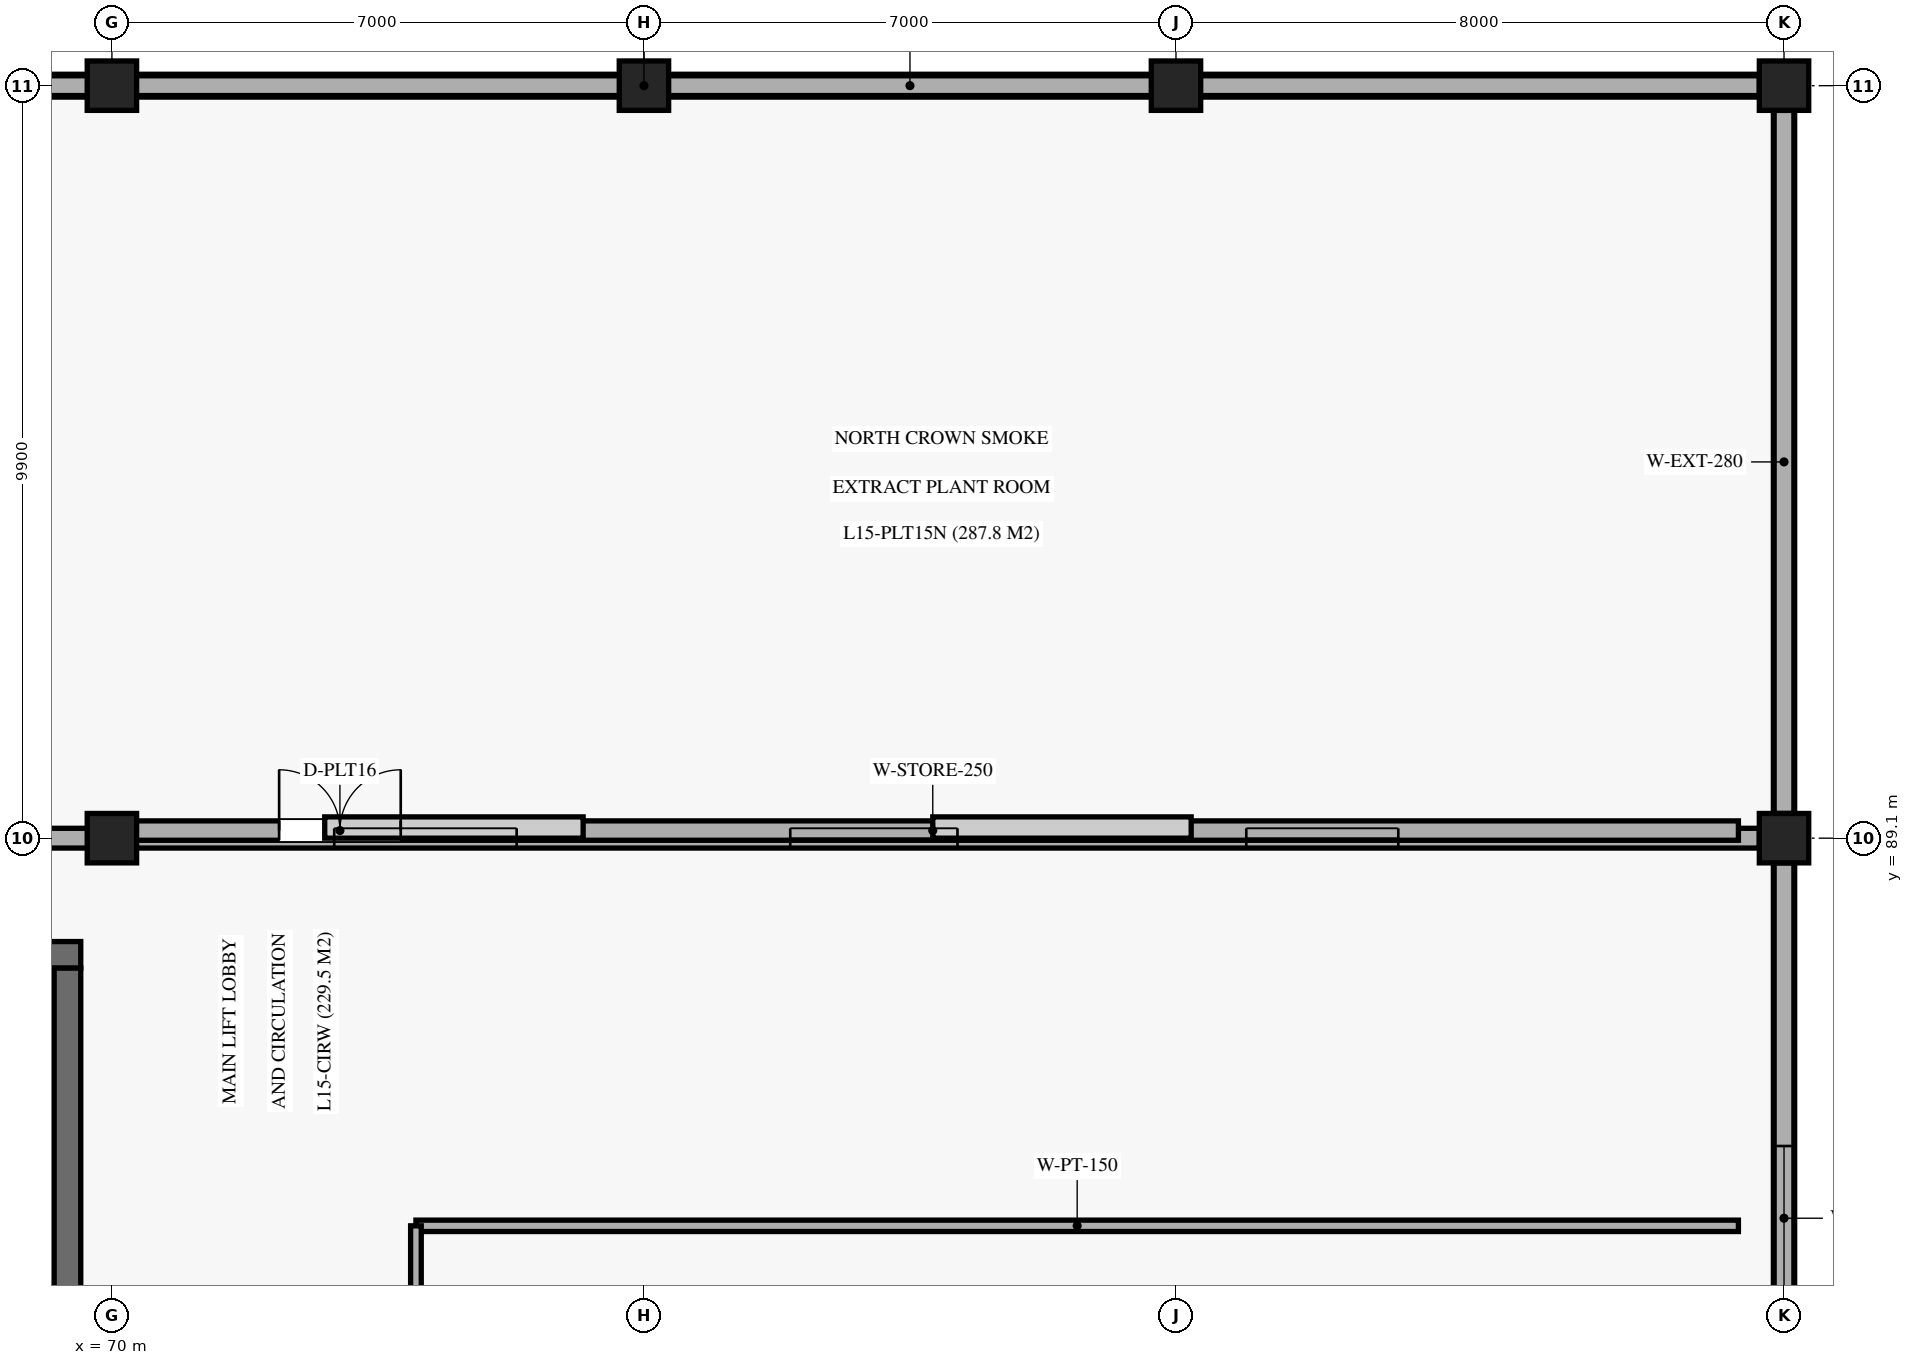
"""IFC4 building model, lengths in metres.
Left out: names, types, materials, properties, quantities, classifications, styles, units other than length and angle.
Written with IfcOpenShell. Run it as: python <this file> out.ifc"""

import sys

from ifc_helpers import new_model, si_unit, direction, frame, frame_2d, origin, origin_2d, place, context, subcontext, project, spatial, polyline, rectangle, outline, extrude, element, fill, save


model = new_model("IFC4")
c1 = context("Model", 3, precision=1e-05, world=origin(), true_north=direction((0.0, 1.0)))
c2 = subcontext(c1, "Body", "Model", "MODEL_VIEW")
j1 = project(units=[si_unit("LENGTHUNIT", "METRE"), si_unit("PLANEANGLEUNIT", "RADIAN")], contexts=[c1])
p1 = place(None, origin())
s1 = spatial("IfcSite", under=j1, at=p1, CompositionType="ELEMENT")
p2 = place(p1, origin())
s2 = spatial("IfcBuilding", under=s1, at=p2, CompositionType="ELEMENT")
p3 = place(p2, frame((0.0, 0.0, 74.46)))
s3 = spatial("IfcBuildingStorey", under=s2, at=p3, CompositionType="ELEMENT", Elevation=74.46)
p4 = place(p3, frame((70.0, 89.1, 0.0), z_axis=(0.0, 0.0, 1.0), x_axis=(1.0, 0.0, 0.0)))
e1 = element("IfcColumn", 1, at=p4, inside=s3, PredefinedType="COLUMN", context=c2, shape_type="SweptSolid", body=[
    extrude(rectangle(XDim=0.65, YDim=0.65, at=origin_2d()), origin(), (0.0, 0.0, 1.0), 7.49),
])
for number, where, z_axis, x_axis in (
    (2, (70.0, 99.0, 0.0), (0.0, 0.0, 1.0), (1.0, 0.0, 0.0)),
    (3, (77.0, 99.0, 0.0), (0.0, 0.0, 1.0), (1.0, 0.0, 0.0)),
    (4, (84.0, 99.0, 0.0), (0.0, 0.0, 1.0), (1.0, 0.0, 0.0)),
):
    element("IfcColumn", number, at=place(p3, frame(where, z_axis=z_axis, x_axis=x_axis)), inside=s3, PredefinedType="COLUMN", context=c2, shape_type="SweptSolid", body=[
        extrude(rectangle(XDim=0.65, YDim=0.65, at=origin_2d()), origin(), (0.0, 0.0, 1.0), 5.66),
    ])
p5 = place(p3, frame((92.0, 89.1, 0.0), z_axis=(0.0, 0.0, 1.0), x_axis=(1.0, 0.0, 0.0)))
e5 = element("IfcColumn", 5, at=p5, inside=s3, PredefinedType="COLUMN", context=c2, shape_type="SweptSolid", body=[
    extrude(rectangle(XDim=0.65, YDim=0.65, at=origin_2d()), origin(), (0.0, 0.0, 1.0), 7.49),
])
p6 = place(p3, frame((92.0, 99.0, 0.0), z_axis=(0.0, 0.0, 1.0), x_axis=(1.0, 0.0, 0.0)))
e6 = element("IfcColumn", 6, at=p6, inside=s3, PredefinedType="COLUMN", context=c2, shape_type="SweptSolid", body=[
    extrude(rectangle(XDim=0.65, YDim=0.65, at=origin_2d()), origin(), (0.0, 0.0, 1.0), 5.66),
])
p7 = place(p3, frame((92.0, 79.525, 0.0), z_axis=(0.0, 0.0, 1.0), x_axis=(0.0, 1.0, 0.0)))
e7 = element("IfcWall", 7, at=p7, inside=s3, PredefinedType="SOLIDWALL", context=c2, shape_type="SweptSolid", body=[
    extrude(rectangle(XDim=9.25, YDim=0.28, at=frame_2d((4.625, 0.0))), origin(), (0.0, 0.0, 1.0), 3.29),
])
p8 = place(p7, frame((3.625, 0.0, 1.45)))
e8 = element("IfcOpeningElement", 8, at=p8, cuts=e7, PredefinedType="OPENING", context=c2, shape_type="SweptSolid", body=[
    extrude(rectangle(XDim=1.9, YDim=1.45, at=frame_2d((0.95, 0.725))), frame((0.0, 0.15, 0.0), z_axis=(0.0, -1.0, 0.0), x_axis=(1.0, 0.0, 0.0)), (0.0, 0.0, 1.0), 0.3),
])
p9 = place(p3, frame((92.0, 89.425, 0.0), z_axis=(0.0, 0.0, 1.0), x_axis=(0.0, 1.0, 0.0)))
e9 = element("IfcWall", 9, at=p9, inside=s3, PredefinedType="SOLIDWALL", context=c2, shape_type="SweptSolid", body=[
    extrude(rectangle(XDim=9.25, YDim=0.28, at=frame_2d((4.625, 0.0))), origin(), (0.0, 0.0, 1.0), 3.29),
])
p10 = place(p3, frame((62.325, 99.0, 0.0), z_axis=(0.0, 0.0, 1.0), x_axis=(1.0, 0.0, 0.0)))
e10 = element("IfcWall", 10, at=p10, inside=s3, PredefinedType="SOLIDWALL", context=c2, shape_type="SweptSolid", body=[
    extrude(rectangle(XDim=7.35, YDim=0.3, at=frame_2d((3.675, 0.0))), origin(), (0.0, 0.0, 1.0), 3.29),
])
for number, where, z_axis, x_axis in (
    (11, (70.325, 99.0, 0.0), (0.0, 0.0, 1.0), (1.0, 0.0, 0.0)),
    (12, (77.325, 99.0, 0.0), (0.0, 0.0, 1.0), (1.0, 0.0, 0.0)),
):
    element("IfcWall", number, at=place(p3, frame(where, z_axis=z_axis, x_axis=x_axis)), inside=s3, PredefinedType="SOLIDWALL", context=c2, shape_type="SweptSolid", body=[
        extrude(rectangle(XDim=6.35, YDim=0.3, at=frame_2d((3.175, 0.0))), origin(), (0.0, 0.0, 1.0), 3.29),
    ])
p11 = place(p3, frame((84.325, 99.0, 0.0), z_axis=(0.0, 0.0, 1.0), x_axis=(1.0, 0.0, 0.0)))
e13 = element("IfcWall", 13, at=p11, inside=s3, PredefinedType="SOLIDWALL", context=c2, shape_type="SweptSolid", body=[
    extrude(rectangle(XDim=7.35, YDim=0.3, at=frame_2d((3.675, 0.0))), origin(), (0.0, 0.0, 1.0), 3.29),
])
p12 = place(p3, frame((62.325, 99.0, 4.04), z_axis=(0.0, 0.0, 1.0), x_axis=(1.0, 0.0, 0.0)))
e14 = element("IfcWall", 14, at=p12, inside=s3, PredefinedType="SOLIDWALL", context=c2, shape_type="SweptSolid", body=[
    extrude(rectangle(XDim=29.35, YDim=0.26, at=frame_2d((14.675, 0.0))), origin(), (0.0, 0.0, 1.0), 1.362),
])
p13 = place(p3, frame((92.0, 89.425, 4.04), z_axis=(0.0, 0.0, 1.0), x_axis=(0.0, 1.0, 0.0)))
e15 = element("IfcWall", 15, at=p13, inside=s3, PredefinedType="SOLIDWALL", context=c2, shape_type="SweptSolid", body=[
    extrude(outline(polyline([(0.0, 0.0), (9.25, 0.0), (9.25, 1.72), (0.0, 0.08), (0.0, 0.0)])), frame((0.0, 0.13, 0.0), z_axis=(0.0, -1.0, 0.0), x_axis=(1.0, 0.0, 0.0)), (0.0, 0.0, 1.0), 0.26),
])
p14 = place(p3, frame((62.325, 89.1, 4.04), z_axis=(0.0, 0.0, 1.0), x_axis=(1.0, 0.0, 0.0)))
e16 = element("IfcWall", 16, at=p14, inside=s3, PredefinedType="SOLIDWALL", context=c2, shape_type="SweptSolid", body=[
    extrude(rectangle(XDim=29.35, YDim=0.26, at=frame_2d((14.675, 0.0))), origin(), (0.0, 0.0, 1.0), 2.956),
])
p15 = place(p14, frame((3.6, 0.0, 1.15)))
e17 = element("IfcOpeningElement", 17, at=p15, cuts=e16, PredefinedType="OPENING", context=c2, shape_type="SweptSolid", body=[
    extrude(rectangle(XDim=2.6, YDim=1.45, at=frame_2d((1.3, 0.725))), frame((0.0, 0.14, 0.0), z_axis=(0.0, -1.0, 0.0), x_axis=(1.0, 0.0, 0.0)), (0.0, 0.0, 1.0), 0.28),
])
p16 = place(p14, frame((10.6, 0.0, 1.15)))
e18 = element("IfcOpeningElement", 18, at=p16, cuts=e16, PredefinedType="OPENING", context=c2, shape_type="SweptSolid", body=[
    extrude(rectangle(XDim=2.4, YDim=1.45, at=frame_2d((1.2, 0.725))), frame((0.0, 0.14, 0.0), z_axis=(0.0, -1.0, 0.0), x_axis=(1.0, 0.0, 0.0)), (0.0, 0.0, 1.0), 0.28),
])
p17 = place(p14, frame((16.6, 0.0, 1.15)))
e19 = element("IfcOpeningElement", 19, at=p17, cuts=e16, PredefinedType="OPENING", context=c2, shape_type="SweptSolid", body=[
    extrude(rectangle(XDim=2.2, YDim=1.45, at=frame_2d((1.1, 0.725))), frame((0.0, 0.14, 0.0), z_axis=(0.0, -1.0, 0.0), x_axis=(1.0, 0.0, 0.0)), (0.0, 0.0, 1.0), 0.28),
])
p18 = place(p14, frame((22.6, 0.0, 1.15)))
e20 = element("IfcOpeningElement", 20, at=p18, cuts=e16, PredefinedType="OPENING", context=c2, shape_type="SweptSolid", body=[
    extrude(rectangle(XDim=2.0, YDim=1.45, at=frame_2d((1.0, 0.725))), frame((0.0, 0.14, 0.0), z_axis=(0.0, -1.0, 0.0), x_axis=(1.0, 0.0, 0.0)), (0.0, 0.0, 1.0), 0.28),
])
p19 = place(p3, frame((92.0, 79.525, 4.04), z_axis=(0.0, 0.0, 1.0), x_axis=(0.0, 1.0, 0.0)))
e21 = element("IfcWall", 21, at=p19, inside=s3, PredefinedType="SOLIDWALL", context=c2, shape_type="SweptSolid", body=[
    extrude(outline(polyline([(0.0, 0.0), (9.25, 0.0), (9.25, 3.62), (0.0, 0.1), (0.0, 0.0)])), frame((0.0, 0.13, 0.0), z_axis=(0.0, -1.0, 0.0), x_axis=(1.0, 0.0, 0.0)), (0.0, 0.0, 1.0), 0.26),
])
p20 = place(p3, frame((62.41, 87.565, 0.0), z_axis=(0.0, 0.0, 1.0), x_axis=(1.0, 0.0, 0.0)))
e22 = element("IfcWall", 22, at=p20, inside=s3, PredefinedType="SHEAR", context=c2, shape_type="SweptSolid", body=[
    extrude(rectangle(XDim=7.18, YDim=0.35, at=frame_2d((3.59, 0.0))), origin(), (0.0, 0.0, 1.0), 4.04),
])
p21 = place(p3, frame((69.415, 80.91, 0.0), z_axis=(0.0, 0.0, 1.0), x_axis=(0.0, 1.0, 0.0)))
e23 = element("IfcWall", 23, at=p21, inside=s3, PredefinedType="SHEAR", context=c2, shape_type="SweptSolid", body=[
    extrude(rectangle(XDim=6.48, YDim=0.35, at=frame_2d((3.24, 0.0))), origin(), (0.0, 0.0, 1.0), 4.04),
])
p22 = place(p3, frame((74.0, 84.0, 0.0), z_axis=(0.0, 0.0, 1.0), x_axis=(1.0, 0.0, 0.0)))
e24 = element("IfcWall", 24, at=p22, inside=s3, PredefinedType="PARTITIONING", context=c2, shape_type="SweptSolid", body=[
    extrude(rectangle(XDim=17.4, YDim=0.15, at=frame_2d((8.7, 0.0))), origin(), (0.0, 0.0, 1.0), 3.16),
])
p23 = place(p3, frame((74.0, 44.5, 0.0), z_axis=(0.0, 0.0, 1.0), x_axis=(0.0, 1.0, 0.0)))
e25 = element("IfcWall", 25, at=p23, inside=s3, PredefinedType="PARTITIONING", context=c2, shape_type="SweptSolid", body=[
    extrude(rectangle(XDim=39.5, YDim=0.14, at=frame_2d((19.75, 0.0))), origin(), (0.0, 0.0, 1.0), 3.16),
])
p24 = place(p23, frame((16.0, 0.0, 0.0)))
e26 = element("IfcOpeningElement", 26, at=p24, cuts=e25, PredefinedType="OPENING", context=c2, shape_type="SweptSolid", body=[
    extrude(rectangle(XDim=2.0, YDim=2.5, at=frame_2d((1.0, 1.25))), frame((0.0, 0.08, 0.0), z_axis=(0.0, -1.0, 0.0), x_axis=(1.0, 0.0, 0.0)), (0.0, 0.0, 1.0), 0.16),
])
p25 = place(p3, frame((70.2, 89.2, 0.0), z_axis=(0.0, 0.0, 1.0), x_axis=(1.0, 0.0, 0.0)))
e27 = element("IfcWall", 27, at=p25, inside=s3, PredefinedType="SOLIDWALL", context=c2, shape_type="SweptSolid", body=[
    extrude(rectangle(XDim=21.2, YDim=0.255, at=frame_2d((10.6, 0.0))), origin(), (0.0, 0.0, 1.0), 3.16),
])
p26 = place(p25, frame((2.0, 0.0, 0.0)))
e28 = element("IfcOpeningElement", 28, at=p26, cuts=e27, PredefinedType="OPENING", context=c2, shape_type="SweptSolid", body=[
    extrude(rectangle(XDim=1.6, YDim=2.25, at=frame_2d((0.8, 1.125))), frame((0.0, 0.137, 0.0), z_axis=(0.0, -1.0, 0.0), x_axis=(1.0, 0.0, 0.0)), (0.0, 0.0, 1.0), 0.275),
])
p27 = place(p8, origin())
e29 = element("IfcWindow", 29, at=p27, inside=s3, PartitioningType="SINGLE_PANEL", PredefinedType="WINDOW", context=c2, shape_type="SweptSolid", body=[
    extrude(rectangle(XDim=1.9, YDim=1.45, at=frame_2d((0.95, 0.725))), frame((0.0, 0.03, 0.0), z_axis=(0.0, -1.0, 0.0), x_axis=(1.0, 0.0, 0.0)), (0.0, 0.0, 1.0), 0.06),
])
fill(e8, e29)
p28 = place(p16, origin())
e30 = element("IfcWindow", 30, at=p28, inside=s3, PartitioningType="SINGLE_PANEL", PredefinedType="SKYLIGHT", context=c2, shape_type="SweptSolid", body=[
    extrude(rectangle(XDim=2.4, YDim=1.45, at=frame_2d((1.2, 0.725))), frame((0.0, 0.03, 0.0), z_axis=(0.0, -1.0, 0.0), x_axis=(1.0, 0.0, 0.0)), (0.0, 0.0, 1.0), 0.06),
])
fill(e18, e30)
p29 = place(p17, origin())
e31 = element("IfcWindow", 31, at=p29, inside=s3, PartitioningType="SINGLE_PANEL", PredefinedType="SKYLIGHT", context=c2, shape_type="SweptSolid", body=[
    extrude(rectangle(XDim=2.2, YDim=1.45, at=frame_2d((1.1, 0.725))), frame((0.0, 0.03, 0.0), z_axis=(0.0, -1.0, 0.0), x_axis=(1.0, 0.0, 0.0)), (0.0, 0.0, 1.0), 0.06),
])
fill(e19, e31)
p30 = place(p18, origin())
e32 = element("IfcWindow", 32, at=p30, inside=s3, PartitioningType="SINGLE_PANEL", PredefinedType="SKYLIGHT", context=c2, shape_type="SweptSolid", body=[
    extrude(rectangle(XDim=2.0, YDim=1.45, at=frame_2d((1.0, 0.725))), frame((0.0, 0.03, 0.0), z_axis=(0.0, -1.0, 0.0), x_axis=(1.0, 0.0, 0.0)), (0.0, 0.0, 1.0), 0.06),
])
fill(e20, e32)
p31 = place(p26, origin())
e33 = element("IfcDoor", 33, at=p31, inside=s3, OperationType="DOUBLE_DOOR_SINGLE_SWING", PredefinedType="DOOR", context=c2, shape_type="SweptSolid", body=[
    extrude(rectangle(XDim=1.6, YDim=2.25, at=frame_2d((0.8, 1.125))), frame((0.0, 0.025, 0.0), z_axis=(0.0, -1.0, 0.0), x_axis=(1.0, 0.0, 0.0)), (0.0, 0.0, 1.0), 0.05),
])
fill(e28, e33)
save(model, sys.argv[1])
